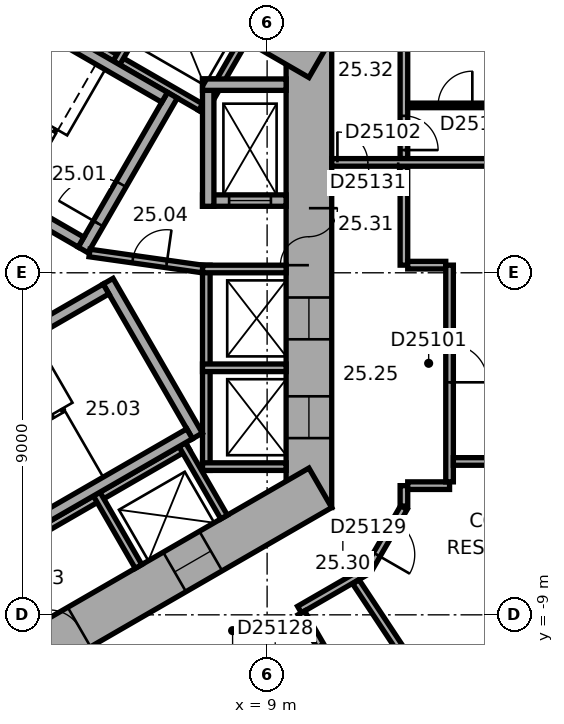
"""IFC4 building model, lengths in metres.
Left out: names, types, materials, properties, quantities, classifications, styles, units other than length and angle.
Written with IfcOpenShell. Run it as: python <this file> out.ifc"""

import sys

from ifc_helpers import new_model, si_unit, direction, frame, frame_2d, origin, place, context, subcontext, project, spatial, rectangle, extrude, element, fill, save


model = new_model("IFC4")
c1 = context("Model", 3, precision=1e-05, world=origin(), true_north=direction((0.0, 1.0)))
c2 = subcontext(c1, "Body", "Model", "MODEL_VIEW")
j1 = project(units=[si_unit("LENGTHUNIT", "METRE"), si_unit("PLANEANGLEUNIT", "RADIAN")], contexts=[c1])
p1 = place(None, origin())
s1 = spatial("IfcSite", under=j1, at=p1, CompositionType="ELEMENT")
p2 = place(p1, origin())
s2 = spatial("IfcBuilding", under=s1, at=p2, CompositionType="ELEMENT")
p3 = place(p2, frame((0.0, 0.0, 106.7)))
s3 = spatial("IfcBuildingStorey", under=s2, at=p3, CompositionType="ELEMENT", Elevation=106.7)
p4 = place(p3, frame((10.1, -6.177, 0.0), z_axis=(0.0, 0.0, 1.0), x_axis=(0.0, 1.0, 0.0)))
e1 = element("IfcWall", 1, at=p4, inside=s3, PredefinedType="SHEAR", context=c2, shape_type="SweptSolid", body=[
    extrude(rectangle(XDim=12.355, YDim=1.2, at=frame_2d((6.177, 0.0))), origin(), (0.0, 0.0, 1.0), 3.3),
])
p5 = place(p4, frame((6.378, 0.0, 0.0)))
e2 = element("IfcOpeningElement", 2, at=p5, cuts=e1, PredefinedType="OPENING", context=c2, shape_type="SweptSolid", body=[
    extrude(rectangle(XDim=1.5, YDim=2.1, at=frame_2d((0.75, 1.05))), frame((0.0, 0.61, 0.0), z_axis=(0.0, -1.0, 0.0), x_axis=(1.0, 0.0, 0.0)), (0.0, 0.0, 1.0), 1.22),
])
p6 = place(p4, frame((1.828, 0.0, 0.0)))
e3 = element("IfcOpeningElement", 3, at=p6, cuts=e1, PredefinedType="OPENING", context=c2, shape_type="SweptSolid", body=[
    extrude(rectangle(XDim=1.1, YDim=2.1, at=frame_2d((0.55, 1.05))), frame((0.0, 0.61, 0.0), z_axis=(0.0, -1.0, 0.0), x_axis=(1.0, 0.0, 0.0)), (0.0, 0.0, 1.0), 1.22),
])
p7 = place(p4, frame((4.427, 0.0, 0.0)))
e4 = element("IfcOpeningElement", 4, at=p7, cuts=e1, PredefinedType="OPENING", context=c2, shape_type="SweptSolid", body=[
    extrude(rectangle(XDim=1.1, YDim=2.1, at=frame_2d((0.55, 1.05))), frame((0.0, 0.61, 0.0), z_axis=(0.0, -1.0, 0.0), x_axis=(1.0, 0.0, 0.0)), (0.0, 0.0, 1.0), 1.22),
])
p8 = place(p3, frame((10.4, 5.658, 0.0), z_axis=(0.0, 0.0, 1.0), x_axis=(-0.866021384402, 0.500006961711, 0.0)))
e5 = element("IfcWall", 5, at=p8, inside=s3, PredefinedType="SHEAR", context=c2, shape_type="SweptSolid", body=[
    extrude(rectangle(XDim=12.355, YDim=1.2, at=frame_2d((6.178, 0.0))), origin(), (0.0, 0.0, 1.0), 3.3),
])
p9 = place(p8, frame((2.728, 0.0, 0.0)))
e6 = element("IfcOpeningElement", 6, at=p9, cuts=e5, PredefinedType="OPENING", context=c2, shape_type="SweptSolid", body=[
    extrude(rectangle(XDim=1.1, YDim=2.1, at=frame_2d((0.55, 1.05))), frame((0.0, 0.61, 0.0), z_axis=(0.0, -1.0, 0.0), x_axis=(1.0, 0.0, 0.0)), (0.0, 0.0, 1.0), 1.22),
])
p10 = place(p8, frame((5.328, 0.0, 0.0)))
e7 = element("IfcOpeningElement", 7, at=p10, cuts=e5, PredefinedType="OPENING", context=c2, shape_type="SweptSolid", body=[
    extrude(rectangle(XDim=1.1, YDim=2.1, at=frame_2d((0.55, 1.05))), frame((0.0, 0.61, 0.0), z_axis=(0.0, -1.0, 0.0), x_axis=(1.0, 0.0, 0.0)), (0.0, 0.0, 1.0), 1.22),
])
p11 = place(p8, frame((7.928, 0.0, 0.0)))
e8 = element("IfcOpeningElement", 8, at=p11, cuts=e5, PredefinedType="OPENING", context=c2, shape_type="SweptSolid", body=[
    extrude(rectangle(XDim=1.1, YDim=2.1, at=frame_2d((0.55, 1.05))), frame((0.0, 0.61, 0.0), z_axis=(0.0, -1.0, 0.0), x_axis=(1.0, 0.0, 0.0)), (0.0, 0.0, 1.0), 1.22),
])
p12 = place(p3, frame((-0.3, -11.836, 0.0), z_axis=(0.0, 0.0, 1.0), x_axis=(0.866021384402, 0.500006961711, 0.0)))
e9 = element("IfcWall", 9, at=p12, inside=s3, PredefinedType="SHEAR", context=c2, shape_type="SweptSolid", body=[
    extrude(rectangle(XDim=12.355, YDim=1.2, at=frame_2d((6.178, 0.0))), origin(), (0.0, 0.0, 1.0), 3.3),
])
p13 = place(p12, frame((4.128, 0.0, 0.0)))
e10 = element("IfcOpeningElement", 10, at=p13, cuts=e9, PredefinedType="OPENING", context=c2, shape_type="SweptSolid", body=[
    extrude(rectangle(XDim=0.9, YDim=2.1, at=frame_2d((0.45, 1.05))), frame((0.0, 0.61, 0.0), z_axis=(0.0, -1.0, 0.0), x_axis=(1.0, 0.0, 0.0)), (0.0, 0.0, 1.0), 1.22),
])
p14 = place(p12, frame((7.928, 0.0, 0.0)))
e11 = element("IfcOpeningElement", 11, at=p14, cuts=e9, PredefinedType="OPENING", context=c2, shape_type="SweptSolid", body=[
    extrude(rectangle(XDim=1.1, YDim=2.1, at=frame_2d((0.55, 1.05))), frame((0.0, 0.61, 0.0), z_axis=(0.0, -1.0, 0.0), x_axis=(1.0, 0.0, 0.0)), (0.0, 0.0, 1.0), 1.22),
])
p15 = place(p3, frame((7.4, -5.2, 0.0), z_axis=(0.0, 0.0, 1.0), x_axis=(0.0, 1.0, 0.0)))
e12 = element("IfcWall", 12, at=p15, inside=s3, PredefinedType="PARTITIONING", context=c2, shape_type="SweptSolid", body=[
    extrude(rectangle(XDim=5.4, YDim=0.2, at=frame_2d((2.7, 0.0))), origin(), (0.0, 0.0, 1.0), 3.05),
])
for number, where, z_axis, x_axis in (
    (13, (7.3, -5.1, 0.0), (0.0, 0.0, 1.0), (1.0, 0.0, 0.0)),
    (14, (7.3, -2.5, 0.0), (0.0, 0.0, 1.0), (1.0, 0.0, 0.0)),
    (15, (7.3, 0.1, 0.0), (0.0, 0.0, 1.0), (1.0, 0.0, 0.0)),
):
    element("IfcWall", number, at=place(p3, frame(where, z_axis=z_axis, x_axis=x_axis)), inside=s3, PredefinedType="PARTITIONING", context=c2, shape_type="SweptSolid", body=[
        extrude(rectangle(XDim=2.2, YDim=0.2, at=frame_2d((1.1, 0.0))), origin(), (0.0, 0.0, 1.0), 3.05),
    ])
p16 = place(p3, frame((7.424, 4.259, 0.0), z_axis=(0.0, 0.0, 1.0), x_axis=(-0.866026010844, 0.49999894854, 0.0)))
e16 = element("IfcWall", 16, at=p16, inside=s3, PredefinedType="PARTITIONING", context=c2, shape_type="SweptSolid", body=[
    extrude(rectangle(XDim=8.0, YDim=0.2, at=frame_2d((4.0, 0.0))), origin(), (0.0, 0.0, 1.0), 3.05),
])
for number, where, z_axis, x_axis in (
    (17, (7.287, 4.222, 0.0), (0.0, 0.0, 1.0), (0.5, 0.866, 0.0)),
    (18, (5.036, 5.522, 0.0), (0.0, 0.0, 1.0), (0.5, 0.866, 0.0)),
):
    element("IfcWall", number, at=place(p3, frame(where, z_axis=z_axis, x_axis=x_axis)), inside=s3, PredefinedType="PARTITIONING", context=c2, shape_type="SweptSolid", body=[
        extrude(rectangle(XDim=2.2, YDim=0.2, at=frame_2d((1.1, 0.0))), origin(), (0.0, 0.0, 1.0), 3.05),
    ])
p17 = place(p3, frame((-0.024, -8.559, 0.0), z_axis=(0.0, 0.0, 1.0), x_axis=(0.866026010844, 0.49999894854, 0.0)))
e19 = element("IfcWall", 19, at=p17, inside=s3, PredefinedType="PARTITIONING", context=c2, shape_type="SweptSolid", body=[
    extrude(rectangle(XDim=8.0, YDim=0.2, at=frame_2d((4.0, 0.0))), origin(), (0.0, 0.0, 1.0), 3.05),
])
for number, where, z_axis, x_axis in (
    (20, (4.516, -5.822, 0.0), (0.0, 0.0, 1.0), (0.5, -0.866, 0.0)),
    (21, (6.768, -4.522, 0.0), (0.0, 0.0, 1.0), (0.5, -0.866, 0.0)),
):
    element("IfcWall", number, at=place(p3, frame(where, z_axis=z_axis, x_axis=x_axis)), inside=s3, PredefinedType="PARTITIONING", context=c2, shape_type="SweptSolid", body=[
        extrude(rectangle(XDim=2.2, YDim=0.2, at=frame_2d((1.1, 0.0))), origin(), (0.0, 0.0, 1.0), 3.05),
    ])
p18 = place(p3, frame((4.158, 0.602, 0.0), z_axis=(0.0, 0.0, 1.0), x_axis=(0.499977259774, 0.866038532462, 0.0)))
e22 = element("IfcWall", 22, at=p18, inside=s3, PredefinedType="SHEAR", context=c2, shape_type="SweptSolid", body=[
    extrude(rectangle(XDim=4.7, YDim=0.3, at=frame_2d((2.35, 0.0))), origin(), (0.0, 0.0, 1.0), 3.05),
])
p19 = place(p18, frame((0.8, 0.0, 0.0)))
e23 = element("IfcOpeningElement", 23, at=p19, cuts=e22, PredefinedType="OPENING", context=c2, shape_type="SweptSolid", body=[
    extrude(rectangle(XDim=1.2, YDim=2.1, at=frame_2d((0.6, 1.05))), frame((0.0, 0.16, 0.0), z_axis=(0.0, -1.0, 0.0), x_axis=(1.0, 0.0, 0.0)), (0.0, 0.0, 1.0), 0.32),
])
for number, where, z_axis, x_axis in (
    (24, (4.103, 0.807, 0.0), (0.0, 0.0, 1.0), (-0.866, 0.5, 0.0)),
    (25, (6.303, 4.617, 0.0), (0.0, 0.0, 1.0), (-0.866, 0.5, 0.0)),
):
    element("IfcWall", number, at=place(p3, frame(where, z_axis=z_axis, x_axis=x_axis)), inside=s3, PredefinedType="SHEAR", context=c2, shape_type="SweptSolid", body=[
        extrude(rectangle(XDim=7.06, YDim=0.3, at=frame_2d((3.53, 0.0))), origin(), (0.0, 0.0, 1.0), 3.05),
    ])
p20 = place(p3, frame((4.816, -0.222, 0.0), z_axis=(0.0, 0.0, 1.0), x_axis=(0.499977259774, -0.866038532462, 0.0)))
e26 = element("IfcWall", 26, at=p20, inside=s3, PredefinedType="SHEAR", context=c2, shape_type="SweptSolid", body=[
    extrude(rectangle(XDim=4.7, YDim=0.3, at=frame_2d((2.35, 0.0))), origin(), (0.0, 0.0, 1.0), 3.05),
])
for number, where, z_axis, x_axis in (
    (27, (-1.353, -3.957, 0.0), (0.0, 0.0, 1.0), (0.866, 0.5, 0.0)),
    (28, (0.847, -7.767, 0.0), (0.0, 0.0, 1.0), (0.866, 0.5, 0.0)),
):
    element("IfcWall", number, at=place(p3, frame(where, z_axis=z_axis, x_axis=x_axis)), inside=s3, PredefinedType="SHEAR", context=c2, shape_type="SweptSolid", body=[
        extrude(rectangle(XDim=7.06, YDim=0.3, at=frame_2d((3.53, 0.0))), origin(), (0.0, 0.0, 1.0), 3.05),
    ])
p21 = place(p3, frame((7.3, 1.9, 0.0), z_axis=(0.0, 0.0, 1.0), x_axis=(1.0, 0.0, 0.0)))
e29 = element("IfcWall", 29, at=p21, inside=s3, PredefinedType="SHEAR", context=c2, shape_type="SweptSolid", body=[
    extrude(rectangle(XDim=2.2, YDim=0.3, at=frame_2d((1.1, 0.0))), origin(), (0.0, 0.0, 1.0), 3.05),
])
p22 = place(p21, frame((0.7, 0.0, 0.0)))
e30 = element("IfcOpeningElement", 30, at=p22, cuts=e29, PredefinedType="OPENING", context=c2, shape_type="SweptSolid", body=[
    extrude(rectangle(XDim=1.1, YDim=2.1, at=frame_2d((0.55, 1.05))), frame((0.0, 0.16, 0.0), z_axis=(0.0, -1.0, 0.0), x_axis=(1.0, 0.0, 0.0)), (0.0, 0.0, 1.0), 0.32),
])
p23 = place(p3, frame((7.45, 1.75, 0.0), z_axis=(0.0, 0.0, 1.0), x_axis=(0.0, 1.0, 0.0)))
e31 = element("IfcWall", 31, at=p23, inside=s3, PredefinedType="SHEAR", context=c2, shape_type="SweptSolid", body=[
    extrude(rectangle(XDim=3.35, YDim=0.3, at=frame_2d((1.675, 0.0))), origin(), (0.0, 0.0, 1.0), 3.05),
])
p24 = place(p3, frame((7.3, 4.95, 0.0), z_axis=(0.0, 0.0, 1.0), x_axis=(1.0, 0.0, 0.0)))
e32 = element("IfcWall", 32, at=p24, inside=s3, PredefinedType="SHEAR", context=c2, shape_type="SweptSolid", body=[
    extrude(rectangle(XDim=2.2, YDim=0.3, at=frame_2d((1.1, 0.0))), origin(), (0.0, 0.0, 1.0), 3.05),
])
p25 = place(p3, frame((4.327, 0.521, 0.0), z_axis=(0.0, 0.0, 1.0), x_axis=(0.990124376366, -0.14019172346, 0.0)))
e33 = element("IfcWall", 33, at=p25, inside=s3, PredefinedType="PARTITIONING", context=c2, shape_type="SweptSolid", body=[
    extrude(rectangle(XDim=3.002, YDim=0.2, at=frame_2d((1.501, 0.0))), origin(), (0.0, 0.0, 1.0), 3.05),
])
p26 = place(p25, frame((1.15, 0.0, 0.0)))
e34 = element("IfcOpeningElement", 34, at=p26, cuts=e33, PredefinedType="OPENING", context=c2, shape_type="SweptSolid", body=[
    extrude(rectangle(XDim=0.9, YDim=2.1, at=frame_2d((0.45, 1.05))), frame((0.0, 0.11, 0.0), z_axis=(0.0, -1.0, 0.0), x_axis=(1.0, 0.0, 0.0)), (0.0, 0.0, 1.0), 0.22),
])
p27 = place(p3, frame((9.852, -8.861, 0.0), z_axis=(0.0, 0.0, 1.0), x_axis=(0.866013291437, 0.500020978615, 0.0)))
e35 = element("IfcWall", 35, at=p27, inside=s3, PredefinedType="PARTITIONING", context=c2, shape_type="SweptSolid", body=[
    extrude(rectangle(XDim=2.077, YDim=0.2, at=frame_2d((1.038, 0.0))), origin(), (0.0, 0.0, 1.0), 3.05),
])
p28 = place(p3, frame((10.402, -9.815, 0.0), z_axis=(0.0, 0.0, 1.0), x_axis=(-0.499968756647, 0.866043441391, 0.0)))
e36 = element("IfcWall", 36, at=p28, inside=s3, PredefinedType="PARTITIONING", context=c2, shape_type="SweptSolid", body=[
    extrude(rectangle(XDim=1.001, YDim=0.2, at=frame_2d((0.5, 0.0))), origin(), (0.0, 0.0, 1.0), 3.05),
])
p29 = place(p3, frame((11.67, -7.788, 0.0), z_axis=(0.0, 0.0, 1.0), x_axis=(0.500063286585, 0.865988862174, 0.0)))
e37 = element("IfcWall", 37, at=p29, inside=s3, PredefinedType="PARTITIONING", context=c2, shape_type="SweptSolid", body=[
    extrude(rectangle(XDim=1.86, YDim=0.2, at=frame_2d((0.93, 0.0))), origin(), (0.0, 0.0, 1.0), 3.05),
])
p30 = place(p29, frame((0.43, 0.0, 0.0)))
e38 = element("IfcOpeningElement", 38, at=p30, cuts=e37, PredefinedType="OPENING", context=c2, shape_type="SweptSolid", body=[
    extrude(rectangle(XDim=1.0, YDim=2.1, at=frame_2d((0.5, 1.05))), frame((0.0, 0.11, 0.0), z_axis=(0.0, -1.0, 0.0), x_axis=(1.0, 0.0, 0.0)), (0.0, 0.0, 1.0), 0.22),
])
p31 = place(p3, frame((12.6, -6.138, 0.0), z_axis=(0.0, 0.0, 1.0), x_axis=(0.0, 1.0, 0.0)))
e39 = element("IfcWall", 39, at=p31, inside=s3, PredefinedType="PARTITIONING", context=c2, shape_type="SweptSolid", body=[
    extrude(rectangle(XDim=0.537, YDim=0.2, at=frame_2d((0.268, 0.0))), origin(), (0.0, 0.0, 1.0), 3.05),
])
p32 = place(p3, frame((12.6, 0.201, 0.0), z_axis=(0.0, 0.0, 1.0), x_axis=(0.0, 1.0, 0.0)))
e40 = element("IfcWall", 40, at=p32, inside=s3, PredefinedType="PARTITIONING", context=c2, shape_type="SweptSolid", body=[
    extrude(rectangle(XDim=2.604, YDim=0.2, at=frame_2d((1.302, 0.0))), origin(), (0.0, 0.0, 1.0), 3.05),
])
p33 = place(p3, frame((12.6, 3.004, 0.0), z_axis=(0.0, 0.0, 1.0), x_axis=(0.0, 1.0, 0.0)))
e41 = element("IfcWall", 41, at=p33, inside=s3, PredefinedType="PARTITIONING", context=c2, shape_type="SweptSolid", body=[
    extrude(rectangle(XDim=3.173, YDim=0.2, at=frame_2d((1.586, 0.0))), origin(), (0.0, 0.0, 1.0), 3.05),
])
p34 = place(p33, frame((0.225, 0.0, 0.0)))
e42 = element("IfcOpeningElement", 42, at=p34, cuts=e41, PredefinedType="OPENING", context=c2, shape_type="SweptSolid", body=[
    extrude(rectangle(XDim=0.9, YDim=2.1, at=frame_2d((0.45, 1.05))), frame((0.0, 0.11, 0.0), z_axis=(0.0, -1.0, 0.0), x_axis=(1.0, 0.0, 0.0)), (0.0, 0.0, 1.0), 0.22),
])
p35 = place(p3, frame((12.7, -5.601, 0.0), z_axis=(0.0, 0.0, 1.0), x_axis=(1.0, 0.0, 0.0)))
e43 = element("IfcWall", 43, at=p35, inside=s3, PredefinedType="PARTITIONING", context=c2, shape_type="SweptSolid", body=[
    extrude(rectangle(XDim=1.101, YDim=0.2, at=frame_2d((0.551, 0.0))), origin(), (0.0, 0.0, 1.0), 3.05),
])
p36 = place(p3, frame((13.701, 0.201, 0.0), z_axis=(0.0, 0.0, 1.0), x_axis=(-1.0, 0.0, 0.0)))
e44 = element("IfcWall", 44, at=p36, inside=s3, PredefinedType="PARTITIONING", context=c2, shape_type="SweptSolid", body=[
    extrude(rectangle(XDim=1.001, YDim=0.2, at=frame_2d((0.5, 0.0))), origin(), (0.0, 0.0, 1.0), 3.05),
])
p37 = place(p3, frame((13.801, -5.501, 0.0), z_axis=(0.0, 0.0, 1.0), x_axis=(0.0, 1.0, 0.0)))
e45 = element("IfcWall", 45, at=p37, inside=s3, PredefinedType="PARTITIONING", context=c2, shape_type="SweptSolid", body=[
    extrude(rectangle(XDim=5.702, YDim=0.2, at=frame_2d((2.851, 0.0))), origin(), (0.0, 0.0, 1.0), 3.05),
])
p38 = place(p37, frame((2.619, 0.0, 0.0)))
e46 = element("IfcOpeningElement", 46, at=p38, cuts=e45, PredefinedType="OPENING", context=c2, shape_type="SweptSolid", body=[
    extrude(rectangle(XDim=1.0, YDim=2.1, at=frame_2d((0.5, 1.05))), frame((0.0, 0.11, 0.0), z_axis=(0.0, -1.0, 0.0), x_axis=(1.0, 0.0, 0.0)), (0.0, 0.0, 1.0), 0.22),
])
p39 = place(p3, frame((13.901, -4.965, 0.0), z_axis=(0.0, 0.0, 1.0), x_axis=(1.0, 0.0, 0.0)))
e47 = element("IfcWall", 47, at=p39, inside=s3, PredefinedType="PARTITIONING", context=c2, shape_type="SweptSolid", body=[
    extrude(rectangle(XDim=8.049, YDim=0.2, at=frame_2d((4.024, 0.0))), origin(), (0.0, 0.0, 1.0), 3.05),
])
p40 = place(p3, frame((15.2, 4.405, 0.0), z_axis=(0.0, 0.0, 1.0), x_axis=(-1.0, 0.0, 0.0)))
e48 = element("IfcWall", 48, at=p40, inside=s3, PredefinedType="PARTITIONING", context=c2, shape_type="SweptSolid", body=[
    extrude(rectangle(XDim=2.5, YDim=0.12, at=frame_2d((1.25, 0.0))), origin(), (0.0, 0.0, 1.0), 3.05),
])
p41 = place(p40, frame((0.8, 0.0, 0.0)))
e49 = element("IfcOpeningElement", 49, at=p41, cuts=e48, PredefinedType="OPENING", context=c2, shape_type="SweptSolid", body=[
    extrude(rectangle(XDim=0.9, YDim=2.1, at=frame_2d((0.45, 1.05))), frame((0.0, 0.07, 0.0), z_axis=(0.0, -1.0, 0.0), x_axis=(1.0, 0.0, 0.0)), (0.0, 0.0, 1.0), 0.14),
])
p42 = place(p3, frame((16.255, -15.564, 0.0), z_axis=(0.0, 0.0, 1.0), x_axis=(-0.55192208744, 0.833895682562, 0.0)))
e50 = element("IfcWall", 50, at=p42, inside=s3, PredefinedType="PARTITIONING", context=c2, shape_type="SweptSolid", body=[
    extrude(rectangle(XDim=8.913, YDim=0.2, at=frame_2d((4.457, 0.0))), origin(), (0.0, 0.0, 1.0), 2.6),
])
p43 = place(p3, frame((21.95, 2.905, 0.0), z_axis=(0.0, 0.0, 1.0), x_axis=(-1.0, 0.0, 0.0)))
e51 = element("IfcWall", 51, at=p43, inside=s3, PredefinedType="PARTITIONING", context=c2, shape_type="SweptSolid", body=[
    extrude(rectangle(XDim=11.25, YDim=0.2, at=frame_2d((5.625, 0.0))), origin(), (0.0, 0.0, 1.0), 3.05),
])
p44 = place(p43, frame((9.5, 0.0, 0.0)))
e52 = element("IfcOpeningElement", 52, at=p44, cuts=e51, PredefinedType="OPENING", context=c2, shape_type="SweptSolid", body=[
    extrude(rectangle(XDim=1.6, YDim=2.1, at=frame_2d((0.8, 1.05))), frame((0.0, 0.11, 0.0), z_axis=(0.0, -1.0, 0.0), x_axis=(1.0, 0.0, 0.0)), (0.0, 0.0, 1.0), 0.22),
])
p45 = place(p5, origin())
e53 = element("IfcDoor", 53, at=p45, inside=s3, OperationType="DOUBLE_DOOR_SINGLE_SWING", PredefinedType="DOOR", context=c2, shape_type="SweptSolid", body=[
    extrude(rectangle(XDim=1.5, YDim=2.1, at=frame_2d((0.75, 1.05))), frame((0.0, 0.025, 0.0), z_axis=(0.0, -1.0, 0.0), x_axis=(1.0, 0.0, 0.0)), (0.0, 0.0, 1.0), 0.05),
])
fill(e2, e53)
p46 = place(p19, origin())
e54 = element("IfcDoor", 54, at=p46, inside=s3, OperationType="SINGLE_SWING_RIGHT", PredefinedType="DOOR", context=c2, shape_type="SweptSolid", body=[
    extrude(rectangle(XDim=1.2, YDim=2.1, at=frame_2d((0.6, 1.05))), frame((0.0, 0.025, 0.0), z_axis=(0.0, -1.0, 0.0), x_axis=(1.0, 0.0, 0.0)), (0.0, 0.0, 1.0), 0.05),
])
fill(e23, e54)
p47 = place(p26, origin())
e55 = element("IfcDoor", 55, at=p47, inside=s3, OperationType="SINGLE_SWING_LEFT", PredefinedType="DOOR", context=c2, shape_type="SweptSolid", body=[
    extrude(rectangle(XDim=0.9, YDim=2.1, at=frame_2d((0.45, 1.05))), frame((0.0, 0.025, 0.0), z_axis=(0.0, -1.0, 0.0), x_axis=(1.0, 0.0, 0.0)), (0.0, 0.0, 1.0), 0.05),
])
fill(e34, e55)
p48 = place(p13, origin())
e56 = element("IfcDoor", 56, at=p48, inside=s3, OperationType="SINGLE_SWING_LEFT", PredefinedType="DOOR", context=c2, shape_type="SweptSolid", body=[
    extrude(rectangle(XDim=0.9, YDim=2.1, at=frame_2d((0.45, 1.05))), frame((0.0, 0.025, 0.0), z_axis=(0.0, -1.0, 0.0), x_axis=(1.0, 0.0, 0.0)), (0.0, 0.0, 1.0), 0.05),
])
fill(e10, e56)
p49 = place(p22, origin())
e57 = element("IfcDoor", 57, at=p49, inside=s3, OperationType="DOUBLE_DOOR_SLIDING", PredefinedType="DOOR", context=c2, shape_type="SweptSolid", body=[
    extrude(rectangle(XDim=1.1, YDim=2.1, at=frame_2d((0.55, 1.05))), frame((0.0, 0.025, 0.0), z_axis=(0.0, -1.0, 0.0), x_axis=(1.0, 0.0, 0.0)), (0.0, 0.0, 1.0), 0.05),
])
fill(e30, e57)
p50 = place(p6, origin())
e58 = element("IfcDoor", 58, at=p50, inside=s3, OperationType="DOUBLE_DOOR_SLIDING", PredefinedType="DOOR", context=c2, shape_type="SweptSolid", body=[
    extrude(rectangle(XDim=1.1, YDim=2.1, at=frame_2d((0.55, 1.05))), frame((0.0, 0.025, 0.0), z_axis=(0.0, -1.0, 0.0), x_axis=(1.0, 0.0, 0.0)), (0.0, 0.0, 1.0), 0.05),
])
fill(e3, e58)
p51 = place(p7, origin())
e59 = element("IfcDoor", 59, at=p51, inside=s3, OperationType="DOUBLE_DOOR_SLIDING", PredefinedType="DOOR", context=c2, shape_type="SweptSolid", body=[
    extrude(rectangle(XDim=1.1, YDim=2.1, at=frame_2d((0.55, 1.05))), frame((0.0, 0.025, 0.0), z_axis=(0.0, -1.0, 0.0), x_axis=(1.0, 0.0, 0.0)), (0.0, 0.0, 1.0), 0.05),
])
fill(e4, e59)
p52 = place(p14, origin())
e60 = element("IfcDoor", 60, at=p52, inside=s3, OperationType="DOUBLE_DOOR_SLIDING", PredefinedType="DOOR", context=c2, shape_type="SweptSolid", body=[
    extrude(rectangle(XDim=1.1, YDim=2.1, at=frame_2d((0.55, 1.05))), frame((0.0, 0.025, 0.0), z_axis=(0.0, -1.0, 0.0), x_axis=(1.0, 0.0, 0.0)), (0.0, 0.0, 1.0), 0.05),
])
fill(e11, e60)
p53 = place(p38, origin())
e61 = element("IfcDoor", 61, at=p53, inside=s3, OperationType="SINGLE_SWING_LEFT", PredefinedType="DOOR", context=c2, shape_type="SweptSolid", body=[
    extrude(rectangle(XDim=1.0, YDim=2.1, at=frame_2d((0.5, 1.05))), frame((0.0, 0.025, 0.0), z_axis=(0.0, -1.0, 0.0), x_axis=(1.0, 0.0, 0.0)), (0.0, 0.0, 1.0), 0.05),
])
fill(e46, e61)
p54 = place(p34, origin())
e62 = element("IfcDoor", 62, at=p54, inside=s3, OperationType="SINGLE_SWING_LEFT", PredefinedType="DOOR", context=c2, shape_type="SweptSolid", body=[
    extrude(rectangle(XDim=0.9, YDim=2.1, at=frame_2d((0.45, 1.05))), frame((0.0, 0.025, 0.0), z_axis=(0.0, -1.0, 0.0), x_axis=(1.0, 0.0, 0.0)), (0.0, 0.0, 1.0), 0.05),
])
fill(e42, e62)
p55 = place(p41, origin())
e63 = element("IfcDoor", 63, at=p55, inside=s3, OperationType="SINGLE_SWING_LEFT", PredefinedType="DOOR", context=c2, shape_type="SweptSolid", body=[
    extrude(rectangle(XDim=0.9, YDim=2.1, at=frame_2d((0.45, 1.05))), frame((0.0, 0.025, 0.0), z_axis=(0.0, -1.0, 0.0), x_axis=(1.0, 0.0, 0.0)), (0.0, 0.0, 1.0), 0.05),
])
fill(e49, e63)
p56 = place(p30, origin())
e64 = element("IfcDoor", 64, at=p56, inside=s3, OperationType="SINGLE_SWING_LEFT", PredefinedType="DOOR", context=c2, shape_type="SweptSolid", body=[
    extrude(rectangle(XDim=1.0, YDim=2.1, at=frame_2d((0.5, 1.05))), frame((0.0, 0.025, 0.0), z_axis=(0.0, -1.0, 0.0), x_axis=(1.0, 0.0, 0.0)), (0.0, 0.0, 1.0), 0.05),
])
fill(e38, e64)
p57 = place(p44, origin())
e65 = element("IfcDoor", 65, at=p57, inside=s3, OperationType="DOUBLE_DOOR_SINGLE_SWING", PredefinedType="DOOR", context=c2, shape_type="SweptSolid", body=[
    extrude(rectangle(XDim=1.6, YDim=2.1, at=frame_2d((0.8, 1.05))), frame((0.0, 0.025, 0.0), z_axis=(0.0, -1.0, 0.0), x_axis=(1.0, 0.0, 0.0)), (0.0, 0.0, 1.0), 0.05),
])
fill(e52, e65)
save(model, sys.argv[1])
